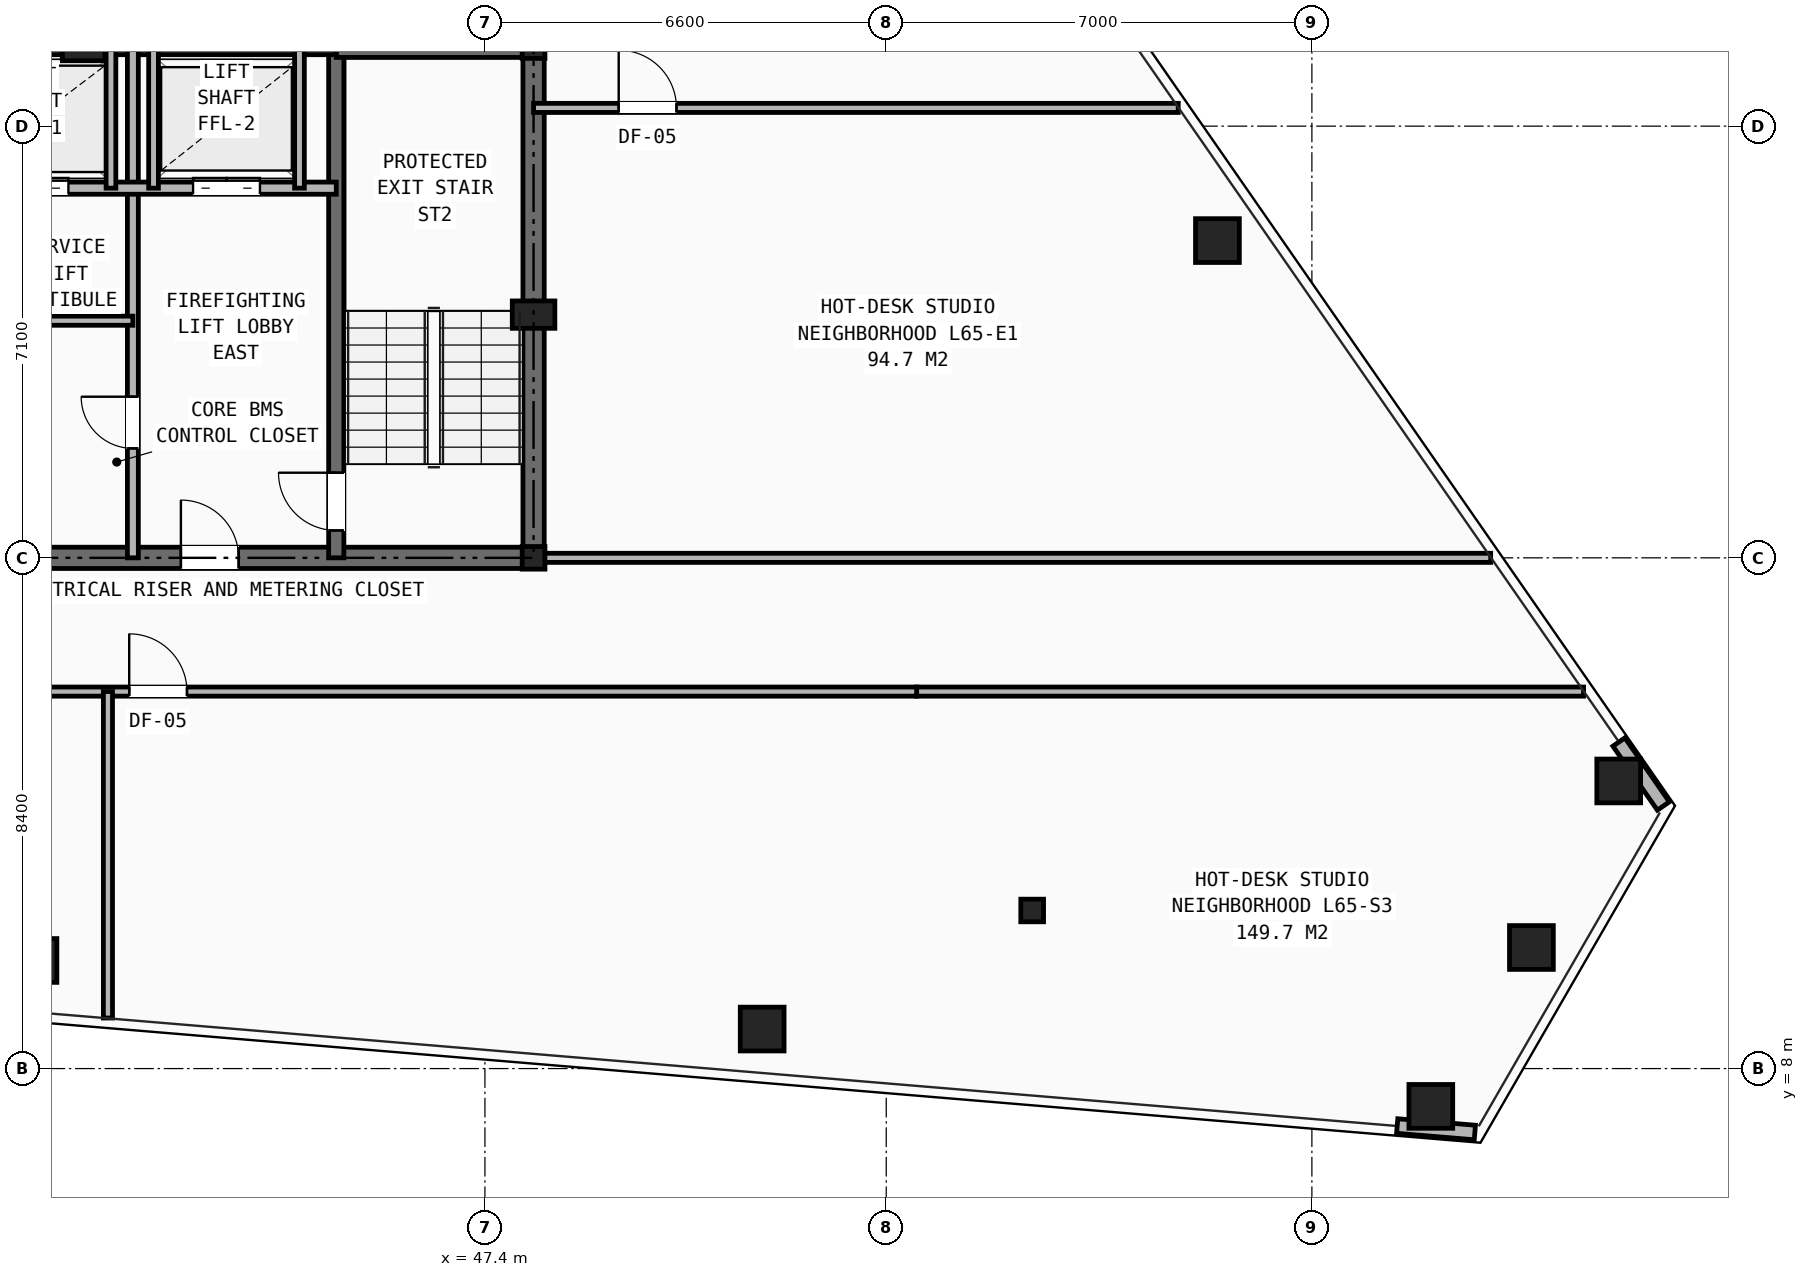
"""IFC4 building model, lengths in metres.
Left out: names, types, materials, properties, quantities, classifications, styles, units other than length and angle.
Written with IfcOpenShell. Run it as: python <this file> out.ifc"""

import sys

from ifc_helpers import new_model, si_unit, direction, frame, frame_2d, origin, origin_2d, place, context, subcontext, project, spatial, rectangle, hollow_rectangle, i_section, extrude, element, fill, save


model = new_model("IFC4")
c1 = context("Model", 3, precision=1e-05, world=origin(), true_north=direction((0.0, 1.0)))
c2 = subcontext(c1, "Body", "Model", "MODEL_VIEW")
j1 = project(units=[si_unit("LENGTHUNIT", "METRE"), si_unit("PLANEANGLEUNIT", "RADIAN")], contexts=[c1])
p1 = place(None, origin())
s1 = spatial("IfcSite", under=j1, at=p1, CompositionType="ELEMENT")
p2 = place(p1, origin())
s2 = spatial("IfcBuilding", under=s1, at=p2, CompositionType="ELEMENT")
p3 = place(p2, frame((0.0, 0.0, 229.4)))
s3 = spatial("IfcBuildingStorey", under=s2, at=p3, CompositionType="ELEMENT", Elevation=229.4)
for number, where, z_axis, x_axis in (
    (1, (48.2, 16.4, 0.0), (0.0, 0.0, 1.0), (1.0, 0.0, 0.0)),
    (2, (48.2, 24.8, 0.0), (0.0, 0.0, 1.0), (1.0, 0.0, 0.0)),
    (3, (56.4, 10.6, 0.0), (0.0, 0.0, 1.0), (1.0, 0.0, 0.0)),
):
    element("IfcColumn", number, at=place(p3, frame(where, z_axis=z_axis, x_axis=x_axis)), inside=s3, PredefinedType="COLUMN", context=c2, shape_type="SweptSolid", body=[
        extrude(i_section(OverallWidth=0.374, OverallDepth=0.372, WebThickness=0.016, FlangeThickness=0.026, at=origin_2d()), origin(), (0.0, 0.0, 1.0), 3.5),
    ])
for number, where, z_axis, x_axis in (
    (4, (48.2, 20.4, 0.0), (0.0, 0.0, 1.0), (1.0, 0.0, 0.0)),
    (5, (40.8, 24.8, 0.0), (0.0, 0.0, 1.0), (1.0, 0.0, 0.0)),
):
    element("IfcColumn", number, at=place(p3, frame(where, z_axis=z_axis, x_axis=x_axis)), inside=s3, PredefinedType="PILASTER", context=c2, shape_type="SweptSolid", body=[
        extrude(rectangle(XDim=0.7, YDim=0.45, at=origin_2d()), origin(), (0.0, 0.0, 1.0), 3.5),
    ])
for number, where, z_axis, x_axis in (
    (6, (40.0, 9.778, 0.0), (0.0, 0.0, 1.0), (1.0, 0.0, 0.0)),
    (7, (51.959, 8.65, 0.0), (0.0, 0.0, 1.0), (1.0, 0.0, 0.0)),
    (8, (62.956, 7.378, 0.0), (0.0, 0.0, 1.0), (1.0, 0.0, 0.0)),
    (9, (64.61, 9.991, 0.0), (0.0, 0.0, 1.0), (1.0, 0.0, 0.0)),
    (10, (66.046, 12.73, 0.0), (0.0, 0.0, 1.0), (1.0, 0.0, 0.0)),
    (11, (59.447, 21.618, 0.0), (0.0, 0.0, 1.0), (1.0, 0.0, 0.0)),
):
    element("IfcColumn", number, at=place(p3, frame(where, z_axis=z_axis, x_axis=x_axis)), inside=s3, PredefinedType="COLUMN", context=c2, shape_type="SweptSolid", body=[
        extrude(hollow_rectangle(XDim=0.72, YDim=0.72, WallThickness=0.05, at=origin_2d()), origin(), (0.0, 0.0, 1.0), 3.5),
    ])
p4 = place(p3, frame((62.403, 7.055, 0.0), z_axis=(0.0, 0.0, 1.0), x_axis=(0.996527336769, -0.083266242097, 0.0)))
e12 = element("IfcWall", 12, at=p4, inside=s3, PredefinedType="SHEAR", context=c2, shape_type="SweptSolid", body=[
    extrude(rectangle(XDim=1.281, YDim=0.24, at=frame_2d((0.641, 0.0))), origin(), (0.0, 0.0, 1.0), 2.623),
])
p5 = place(p3, frame((66.781, 12.318, 0.0), z_axis=(0.0, 0.0, 1.0), x_axis=(-0.5703386897, 0.821409629254, 0.0)))
e13 = element("IfcWall", 13, at=p5, inside=s3, PredefinedType="SHEAR", context=c2, shape_type="SweptSolid", body=[
    extrude(rectangle(XDim=1.282, YDim=0.24, at=frame_2d((0.641, 0.0))), origin(), (0.0, 0.0, 1.0), 2.623),
])
p6 = place(p3, frame((31.8, 16.4, 0.0), z_axis=(0.0, 0.0, 1.0), x_axis=(1.0, 0.0, 0.0)))
e14 = element("IfcWall", 14, at=p6, inside=s3, PredefinedType="SHEAR", context=c2, shape_type="SweptSolid", body=[
    extrude(rectangle(XDim=16.4, YDim=0.35, at=frame_2d((8.2, 0.0))), origin(), (0.0, 0.0, 1.0), 3.25),
])
p7 = place(p6, frame((4.2, 0.0, 0.0)))
e15 = element("IfcOpeningElement", 15, at=p7, cuts=e14, PredefinedType="OPENING", context=c2, shape_type="SweptSolid", body=[
    extrude(rectangle(XDim=0.95, YDim=2.1, at=frame_2d((0.475, 1.05))), frame((0.0, 0.185, 0.0), z_axis=(0.0, -1.0, 0.0), x_axis=(1.0, 0.0, 0.0)), (0.0, 0.0, 1.0), 0.37),
])
p8 = place(p6, frame((10.6, 0.0, 0.0)))
e16 = element("IfcOpeningElement", 16, at=p8, cuts=e14, PredefinedType="OPENING", context=c2, shape_type="SweptSolid", body=[
    extrude(rectangle(XDim=0.95, YDim=2.1, at=frame_2d((0.475, 1.05))), frame((0.0, 0.185, 0.0), z_axis=(0.0, -1.0, 0.0), x_axis=(1.0, 0.0, 0.0)), (0.0, 0.0, 1.0), 0.37),
])
p9 = place(p3, frame((48.2, 16.4, 0.0), z_axis=(0.0, 0.0, 1.0), x_axis=(0.0, 1.0, 0.0)))
e17 = element("IfcWall", 17, at=p9, inside=s3, PredefinedType="SHEAR", context=c2, shape_type="SweptSolid", body=[
    extrude(rectangle(XDim=14.8, YDim=0.35, at=frame_2d((7.4, 0.0))), origin(), (0.0, 0.0, 1.0), 3.25),
])
p10 = place(p9, frame((11.0, 0.0, 0.0)))
e18 = element("IfcOpeningElement", 18, at=p10, cuts=e17, PredefinedType="OPENING", context=c2, shape_type="SweptSolid", body=[
    extrude(rectangle(XDim=1.1, YDim=2.15, at=frame_2d((0.55, 1.075))), frame((0.0, 0.185, 0.0), z_axis=(0.0, -1.0, 0.0), x_axis=(1.0, 0.0, 0.0)), (0.0, 0.0, 1.0), 0.37),
])
p11 = place(p3, frame((44.955, 16.4, 0.0), z_axis=(0.0, 0.0, 1.0), x_axis=(0.0, 1.0, 0.0)))
e19 = element("IfcWall", 19, at=p11, inside=s3, PredefinedType="SHEAR", context=c2, shape_type="SweptSolid", body=[
    extrude(rectangle(XDim=8.4, YDim=0.25, at=frame_2d((4.2, 0.0))), origin(), (0.0, 0.0, 1.0), 3.25),
])
p12 = place(p11, frame((0.45, 0.0, 0.0)))
e20 = element("IfcOpeningElement", 20, at=p12, cuts=e19, PredefinedType="OPENING", context=c2, shape_type="SweptSolid", body=[
    extrude(rectangle(XDim=0.95, YDim=2.1, at=frame_2d((0.475, 1.05))), frame((0.0, 0.135, 0.0), z_axis=(0.0, -1.0, 0.0), x_axis=(1.0, 0.0, 0.0)), (0.0, 0.0, 1.0), 0.27),
])
p13 = place(p3, frame((44.955, 24.755, 0.0), z_axis=(0.0, 0.0, 1.0), x_axis=(1.0, 0.0, 0.0)))
e21 = element("IfcWall", 21, at=p13, inside=s3, PredefinedType="SHEAR", context=c2, shape_type="SweptSolid", body=[
    extrude(rectangle(XDim=3.245, YDim=0.25, at=frame_2d((1.623, 0.0))), origin(), (0.0, 0.0, 1.0), 3.25),
])
p14 = place(p3, frame((35.045, 24.8, 0.0), z_axis=(0.0, 0.0, 1.0), x_axis=(1.0, 0.0, 0.0)))
e22 = element("IfcWall", 22, at=p14, inside=s3, PredefinedType="SHEAR", context=c2, shape_type="SweptSolid", body=[
    extrude(rectangle(XDim=9.91, YDim=0.25, at=frame_2d((4.955, 0.0))), origin(), (0.0, 0.0, 1.0), 3.25),
])
p15 = place(p3, frame((41.61, 16.4, 0.0), z_axis=(0.0, 0.0, 1.0), x_axis=(0.0, 1.0, 0.0)))
e23 = element("IfcWall", 23, at=p15, inside=s3, PredefinedType="PARTITIONING", context=c2, shape_type="SweptSolid", body=[
    extrude(rectangle(XDim=8.4, YDim=0.18, at=frame_2d((4.2, 0.0))), origin(), (0.0, 0.0, 1.0), 2.978),
])
p16 = place(p15, frame((1.8, 0.0, 0.0)))
e24 = element("IfcOpeningElement", 24, at=p16, cuts=e23, PredefinedType="OPENING", context=c2, shape_type="SweptSolid", body=[
    extrude(rectangle(XDim=0.85, YDim=2.05, at=frame_2d((0.425, 1.025))), frame((0.0, 0.1, 0.0), z_axis=(0.0, -1.0, 0.0), x_axis=(1.0, 0.0, 0.0)), (0.0, 0.0, 1.0), 0.2),
])
p17 = place(p3, frame((35.045, 22.48, 0.0), z_axis=(0.0, 0.0, 1.0), x_axis=(1.0, 0.0, 0.0)))
e25 = element("IfcWall", 25, at=p17, inside=s3, PredefinedType="SOLIDWALL", context=c2, shape_type="SweptSolid", body=[
    extrude(rectangle(XDim=9.91, YDim=0.2, at=frame_2d((4.955, 0.0))), origin(), (0.0, 0.0, 1.0), 3.25),
])
p18 = place(p17, frame((1.255, 0.0, 0.0)))
e26 = element("IfcOpeningElement", 26, at=p18, cuts=e25, PredefinedType="OPENING", context=c2, shape_type="SweptSolid", body=[
    extrude(rectangle(XDim=1.1, YDim=2.15, at=frame_2d((0.55, 1.075))), frame((0.0, 0.11, 0.0), z_axis=(0.0, -1.0, 0.0), x_axis=(1.0, 0.0, 0.0)), (0.0, 0.0, 1.0), 0.22),
])
p19 = place(p17, frame((7.555, 0.0, 0.0)))
e27 = element("IfcOpeningElement", 27, at=p19, cuts=e25, PredefinedType="OPENING", context=c2, shape_type="SweptSolid", body=[
    extrude(rectangle(XDim=1.1, YDim=2.15, at=frame_2d((0.55, 1.075))), frame((0.0, 0.11, 0.0), z_axis=(0.0, -1.0, 0.0), x_axis=(1.0, 0.0, 0.0)), (0.0, 0.0, 1.0), 0.22),
])
p20 = place(p17, frame((4.405, 0.0, 0.0)))
e28 = element("IfcOpeningElement", 28, at=p20, cuts=e25, PredefinedType="OPENING", context=c2, shape_type="SweptSolid", body=[
    extrude(rectangle(XDim=1.1, YDim=2.15, at=frame_2d((0.55, 1.075))), frame((0.0, 0.11, 0.0), z_axis=(0.0, -1.0, 0.0), x_axis=(1.0, 0.0, 0.0)), (0.0, 0.0, 1.0), 0.22),
])
p21 = place(p3, frame((38.39, 20.3, 0.0), z_axis=(0.0, 0.0, 1.0), x_axis=(1.0, 0.0, 0.0)))
e29 = element("IfcWall", 29, at=p21, inside=s3, PredefinedType="PARTITIONING", context=c2, shape_type="SweptSolid", body=[
    extrude(rectangle(XDim=3.22, YDim=0.15, at=frame_2d((1.61, 0.0))), origin(), (0.0, 0.0, 1.0), 3.25),
])
for number, where, z_axis, x_axis in (
    (30, (41.95, 22.48, 0.0), (0.0, 0.0, 1.0), (0.0, 1.0, 0.0)),
    (31, (44.35, 22.48, 0.0), (0.0, 0.0, 1.0), (0.0, 1.0, 0.0)),
    (32, (41.25, 22.48, 0.0), (0.0, 0.0, 1.0), (0.0, 1.0, 0.0)),
):
    element("IfcWall", number, at=place(p3, frame(where, z_axis=z_axis, x_axis=x_axis)), inside=s3, PredefinedType="SOLIDWALL", context=c2, shape_type="SweptSolid", body=[
        extrude(rectangle(XDim=2.32, YDim=0.16, at=frame_2d((1.16, 0.0))), origin(), (0.0, 0.0, 1.0), 3.25),
    ])
p22 = place(p3, frame((54.5, 14.2, 0.0), z_axis=(0.0, 0.0, 1.0), x_axis=(1.0, 0.0, 0.0)))
e33 = element("IfcWall", 33, at=p22, inside=s3, PredefinedType="PARTITIONING", context=c2, shape_type="SweptSolid", body=[
    extrude(rectangle(XDim=10.968, YDim=0.15, at=frame_2d((5.484, 0.0))), origin(), (0.0, 0.0, 1.0), 2.292),
])
p23 = place(p3, frame((48.2, 16.4, 0.0), z_axis=(0.0, 0.0, 1.0), x_axis=(1.0, 0.0, 0.0)))
e34 = element("IfcWall", 34, at=p23, inside=s3, PredefinedType="PARTITIONING", context=c2, shape_type="SweptSolid", body=[
    extrude(rectangle(XDim=15.74, YDim=0.15, at=frame_2d((7.87, 0.0))), origin(), (0.0, 0.0, 1.0), 2.292),
])
p24 = place(p3, frame((25.5, 14.2, 0.0), z_axis=(0.0, 0.0, 1.0), x_axis=(1.0, 0.0, 0.0)))
e35 = element("IfcWall", 35, at=p24, inside=s3, PredefinedType="PARTITIONING", context=c2, shape_type="SweptSolid", body=[
    extrude(rectangle(XDim=29.0, YDim=0.15, at=frame_2d((14.5, 0.0))), origin(), (0.0, 0.0, 1.0), 2.292),
])
p25 = place(p24, frame((0.85, 0.0, 0.0)))
e36 = element("IfcOpeningElement", 36, at=p25, cuts=e35, PredefinedType="OPENING", context=c2, shape_type="SweptSolid", body=[
    extrude(rectangle(XDim=0.95, YDim=2.1, at=frame_2d((0.475, 1.05))), frame((0.0, 0.085, 0.0), z_axis=(0.0, -1.0, 0.0), x_axis=(1.0, 0.0, 0.0)), (0.0, 0.0, 1.0), 0.17),
])
p26 = place(p24, frame((9.35, 0.0, 0.0)))
e37 = element("IfcOpeningElement", 37, at=p26, cuts=e35, PredefinedType="OPENING", context=c2, shape_type="SweptSolid", body=[
    extrude(rectangle(XDim=0.95, YDim=2.1, at=frame_2d((0.475, 1.05))), frame((0.0, 0.085, 0.0), z_axis=(0.0, -1.0, 0.0), x_axis=(1.0, 0.0, 0.0)), (0.0, 0.0, 1.0), 0.17),
])
p27 = place(p24, frame((16.05, 0.0, 0.0)))
e38 = element("IfcOpeningElement", 38, at=p27, cuts=e35, PredefinedType="OPENING", context=c2, shape_type="SweptSolid", body=[
    extrude(rectangle(XDim=0.95, YDim=2.1, at=frame_2d((0.475, 1.05))), frame((0.0, 0.085, 0.0), z_axis=(0.0, -1.0, 0.0), x_axis=(1.0, 0.0, 0.0)), (0.0, 0.0, 1.0), 0.17),
])
p28 = place(p3, frame((41.2, 8.831, 0.0), z_axis=(0.0, 0.0, 1.0), x_axis=(0.0, 1.0, 0.0)))
e39 = element("IfcWall", 39, at=p28, inside=s3, PredefinedType="PARTITIONING", context=c2, shape_type="SweptSolid", body=[
    extrude(rectangle(XDim=5.369, YDim=0.15, at=frame_2d((2.684, 0.0))), origin(), (0.0, 0.0, 1.0), 2.628),
])
p29 = place(p3, frame((48.2, 23.8, 0.0), z_axis=(0.0, 0.0, 1.0), x_axis=(1.0, 0.0, 0.0)))
e40 = element("IfcWall", 40, at=p29, inside=s3, PredefinedType="PARTITIONING", context=c2, shape_type="SweptSolid", body=[
    extrude(rectangle(XDim=10.602, YDim=0.15, at=frame_2d((5.301, 0.0))), origin(), (0.0, 0.0, 1.0), 2.628),
])
p30 = place(p29, frame((1.4, 0.0, 0.0)))
e41 = element("IfcOpeningElement", 41, at=p30, cuts=e40, PredefinedType="OPENING", context=c2, shape_type="SweptSolid", body=[
    extrude(rectangle(XDim=0.95, YDim=2.1, at=frame_2d((0.475, 1.05))), frame((0.0, 0.085, 0.0), z_axis=(0.0, -1.0, 0.0), x_axis=(1.0, 0.0, 0.0)), (0.0, 0.0, 1.0), 0.17),
])
p31 = place(p16, origin())
e42 = element("IfcDoor", 42, at=p31, inside=s3, OperationType="SINGLE_SWING_RIGHT", PredefinedType="DOOR", context=c2, shape_type="SweptSolid", body=[
    extrude(rectangle(XDim=0.85, YDim=2.05, at=frame_2d((0.425, 1.025))), frame((0.0, 0.025, 0.0), z_axis=(0.0, -1.0, 0.0), x_axis=(1.0, 0.0, 0.0)), (0.0, 0.0, 1.0), 0.05),
])
fill(e24, e42)
p32 = place(p12, origin())
e43 = element("IfcDoor", 43, at=p32, inside=s3, OperationType="SINGLE_SWING_RIGHT", PredefinedType="DOOR", context=c2, shape_type="SweptSolid", body=[
    extrude(rectangle(XDim=0.95, YDim=2.1, at=frame_2d((0.475, 1.05))), frame((0.0, 0.025, 0.0), z_axis=(0.0, -1.0, 0.0), x_axis=(1.0, 0.0, 0.0)), (0.0, 0.0, 1.0), 0.05),
])
fill(e20, e43)
p33 = place(p8, origin())
e44 = element("IfcDoor", 44, at=p33, inside=s3, OperationType="SINGLE_SWING_LEFT", PredefinedType="DOOR", context=c2, shape_type="SweptSolid", body=[
    extrude(rectangle(XDim=0.95, YDim=2.1, at=frame_2d((0.475, 1.05))), frame((0.0, 0.025, 0.0), z_axis=(0.0, -1.0, 0.0), x_axis=(1.0, 0.0, 0.0)), (0.0, 0.0, 1.0), 0.05),
])
fill(e16, e44)
p34 = place(p19, origin())
e45 = element("IfcDoor", 45, at=p34, inside=s3, OperationType="DOUBLE_DOOR_SLIDING", PredefinedType="DOOR", context=c2, shape_type="SweptSolid", body=[
    extrude(rectangle(XDim=1.1, YDim=2.15, at=frame_2d((0.55, 1.075))), frame((0.0, 0.025, 0.0), z_axis=(0.0, -1.0, 0.0), x_axis=(1.0, 0.0, 0.0)), (0.0, 0.0, 1.0), 0.05),
])
fill(e27, e45)
p35 = place(p20, origin())
e46 = element("IfcDoor", 46, at=p35, inside=s3, OperationType="DOUBLE_DOOR_SLIDING", PredefinedType="DOOR", context=c2, shape_type="SweptSolid", body=[
    extrude(rectangle(XDim=1.1, YDim=2.15, at=frame_2d((0.55, 1.075))), frame((0.0, 0.025, 0.0), z_axis=(0.0, -1.0, 0.0), x_axis=(1.0, 0.0, 0.0)), (0.0, 0.0, 1.0), 0.05),
])
fill(e28, e46)
p36 = place(p27, origin())
e47 = element("IfcDoor", 47, at=p36, inside=s3, OperationType="SINGLE_SWING_LEFT", PredefinedType="DOOR", context=c2, shape_type="SweptSolid", body=[
    extrude(rectangle(XDim=0.95, YDim=2.1, at=frame_2d((0.475, 1.05))), frame((0.0, 0.025, 0.0), z_axis=(0.0, -1.0, 0.0), x_axis=(1.0, 0.0, 0.0)), (0.0, 0.0, 1.0), 0.05),
])
fill(e38, e47)
p37 = place(p30, origin())
e48 = element("IfcDoor", 48, at=p37, inside=s3, OperationType="SINGLE_SWING_LEFT", PredefinedType="DOOR", context=c2, shape_type="SweptSolid", body=[
    extrude(rectangle(XDim=0.95, YDim=2.1, at=frame_2d((0.475, 1.05))), frame((0.0, 0.025, 0.0), z_axis=(0.0, -1.0, 0.0), x_axis=(1.0, 0.0, 0.0)), (0.0, 0.0, 1.0), 0.05),
])
fill(e41, e48)
save(model, sys.argv[1])
